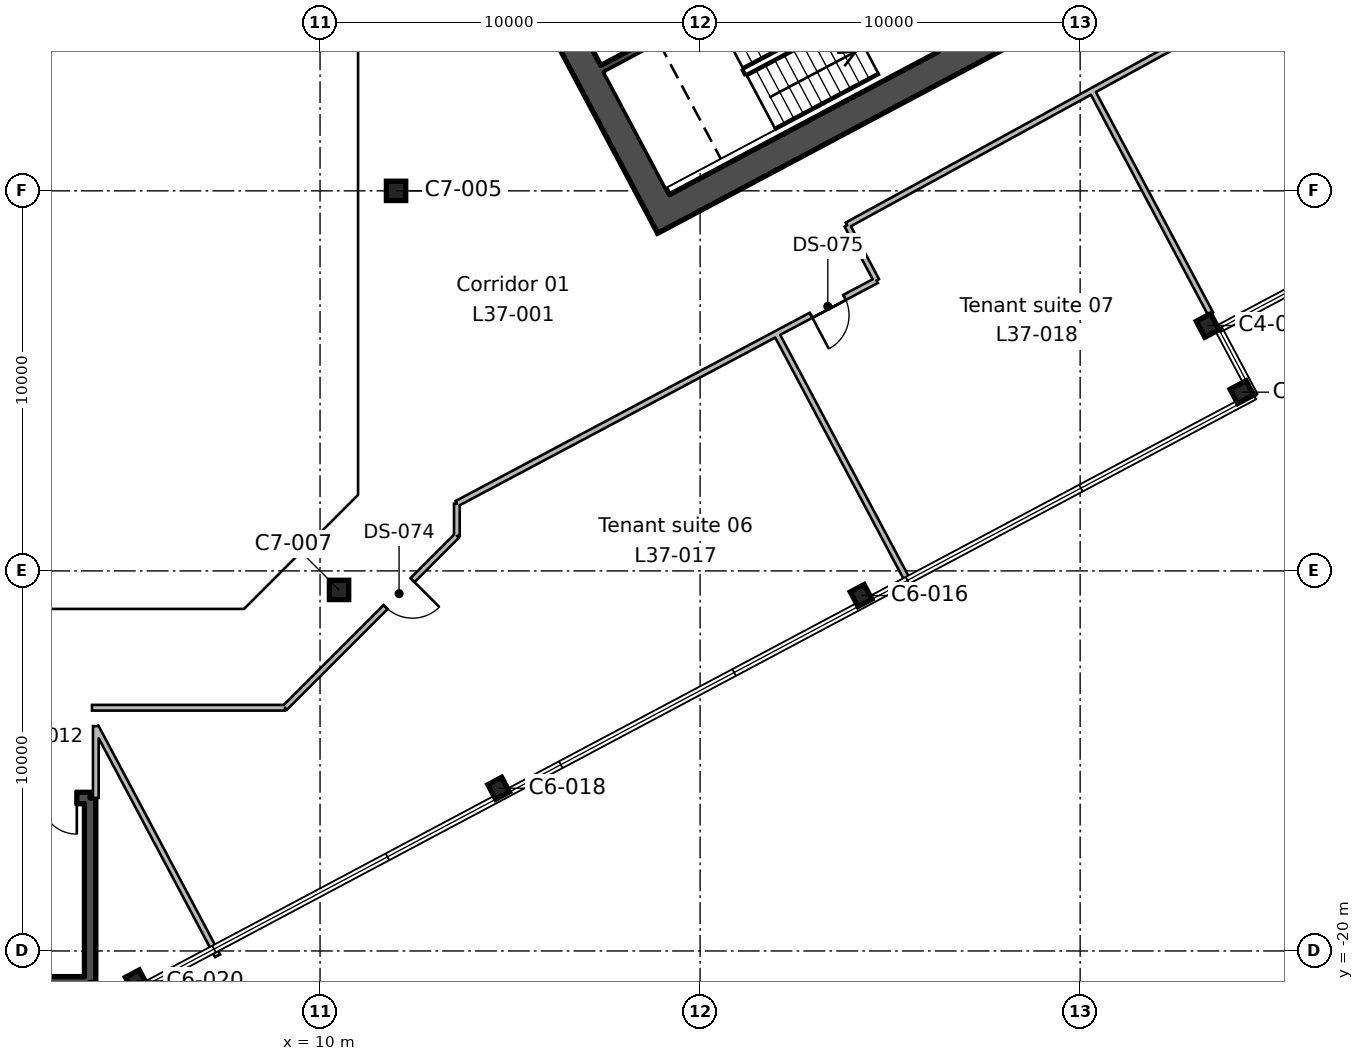
"""IFC4 building model, lengths in metres.
Left out: names, types, materials, properties, quantities, classifications, styles, units other than length and angle.
Written with IfcOpenShell. Run it as: python <this file> out.ifc"""

import sys

from ifc_helpers import new_model, si_unit, direction, frame, frame_2d, origin, origin_2d, place, context, subcontext, project, spatial, rectangle, hollow_rectangle, i_section, extrude, element, fill, save


model = new_model("IFC4")
c1 = context("Model", 3, precision=1e-05, world=origin(), true_north=direction((0.0, 1.0)))
c2 = subcontext(c1, "Body", "Model", "MODEL_VIEW")
j1 = project(units=[si_unit("LENGTHUNIT", "METRE"), si_unit("PLANEANGLEUNIT", "RADIAN")], contexts=[c1])
p1 = place(None, origin())
s1 = spatial("IfcSite", under=j1, at=p1, CompositionType="ELEMENT")
p2 = place(p1, origin())
s2 = spatial("IfcBuilding", under=s1, at=p2, CompositionType="ELEMENT")
p3 = place(p2, frame((0.0, 0.0, 174.2)))
s3 = spatial("IfcBuildingStorey", under=s2, at=p3, CompositionType="ELEMENT", Elevation=174.2)
for number, where, z_axis, x_axis in (
    (1, (5.164, -20.789, 0.0), (0.0, 0.0, 1.0), (0.883, 0.469, 0.0)),
    (2, (14.7, -15.719, 0.0), (0.0, 0.0, 1.0), (0.883, 0.469, 0.0)),
    (3, (24.236, -10.648, 0.0), (0.0, 0.0, 1.0), (0.883, 0.469, 0.0)),
):
    element("IfcColumn", number, at=place(p3, frame(where, z_axis=z_axis, x_axis=x_axis)), inside=s3, PredefinedType="COLUMN", context=c2, shape_type="SweptSolid", body=[
        extrude(i_section(OverallWidth=0.412, OverallDepth=0.434, WebThickness=0.036, FlangeThickness=0.057, FilletRadius=0.015, at=origin_2d()), origin(), (0.0, 0.0, 1.0), 4.0),
    ])
p4 = place(p3, frame((10.5, -10.5, 0.0), z_axis=(0.0, 0.0, 1.0), x_axis=(1.0, 0.0, 0.0)))
e4 = element("IfcColumn", 4, at=p4, inside=s3, PredefinedType="COLUMN", context=c2, shape_type="SweptSolid", body=[
    extrude(hollow_rectangle(XDim=0.508, YDim=0.508, WallThickness=0.012, InnerFilletRadius=0.006, OuterFilletRadius=0.018, at=origin_2d()), origin(), (0.0, 0.0, 1.0), 4.0),
])
for number, where, z_axis, x_axis in (
    (5, (34.256, -5.297, 0.0), (0.0, 0.0, 1.0), (-0.469, 0.883, 0.0)),
    (6, (33.356, -3.543, 0.0), (0.0, 0.0, 1.0), (0.883, 0.469, 0.0)),
):
    element("IfcColumn", number, at=place(p3, frame(where, z_axis=z_axis, x_axis=x_axis)), inside=s3, PredefinedType="COLUMN", context=c2, shape_type="SweptSolid", body=[
        extrude(i_section(OverallWidth=0.424, OverallDepth=0.475, WebThickness=0.048, FlangeThickness=0.077, FilletRadius=0.015, at=origin_2d()), origin(), (0.0, 0.0, 1.0), 4.0),
    ])
p5 = place(p3, frame((12.0, 0.0, 0.0), z_axis=(0.0, 0.0, 1.0), x_axis=(1.0, 0.0, 0.0)))
e7 = element("IfcColumn", 7, at=p5, inside=s3, PredefinedType="COLUMN", context=c2, shape_type="SweptSolid", body=[
    extrude(hollow_rectangle(XDim=0.508, YDim=0.508, WallThickness=0.012, InnerFilletRadius=0.006, OuterFilletRadius=0.018, at=origin_2d()), origin(), (0.0, 0.0, 1.0), 4.0),
])
p6 = place(p3, frame((19.215, -0.939, 0.0), z_axis=(0.0, 0.0, 1.0), x_axis=(-0.469479580143, 0.882943329908, 0.0)))
e8 = element("IfcWall", 8, at=p6, inside=s3, PredefinedType="SHEAR", context=c2, shape_type="SweptSolid", body=[
    extrude(rectangle(XDim=19.7, YDim=0.75, at=frame_2d((9.85, 0.0))), origin(), (0.0, 0.0, 1.0), 4.0),
])
p7 = place(p6, frame((6.85, 0.0, 0.0)))
e9 = element("IfcOpeningElement", 9, at=p7, cuts=e8, PredefinedType="OPENING", context=c2, shape_type="SweptSolid", body=[
    extrude(rectangle(XDim=2.4, YDim=2.4, at=frame_2d((1.2, 1.2))), frame((0.0, 0.385, 0.0), z_axis=(0.0, -1.0, 0.0), x_axis=(1.0, 0.0, 0.0)), (0.0, 0.0, 1.0), 0.77),
])
p8 = place(p3, frame((19.37, -0.432, 0.0), z_axis=(0.0, 0.0, 1.0), x_axis=(0.88294509198, 0.469476266226, 0.0)))
e10 = element("IfcWall", 10, at=p8, inside=s3, PredefinedType="SHEAR", context=c2, shape_type="SweptSolid", body=[
    extrude(rectangle(XDim=20.2, YDim=0.75, at=frame_2d((10.1, 0.0))), origin(), (0.0, 0.0, 1.0), 4.0),
])
p9 = place(p3, frame((17.434, 3.21, 0.0), z_axis=(0.0, 0.0, 1.0), x_axis=(0.882940221191, 0.469485426614, 0.0)))
e11 = element("IfcWall", 11, at=p9, inside=s3, PredefinedType="SHEAR", context=c2, shape_type="SweptSolid", body=[
    extrude(rectangle(XDim=8.0, YDim=0.2, at=frame_2d((4.0, 0.0))), origin(), (0.0, 0.0, 1.0), 4.0),
])
p10 = place(p3, frame((3.95, -15.975, 0.0), z_axis=(0.0, 0.0, 1.0), x_axis=(0.0, -1.0, 0.0)))
e12 = element("IfcWall", 12, at=p10, inside=s3, PredefinedType="SHEAR", context=c2, shape_type="SweptSolid", body=[
    extrude(rectangle(XDim=4.85, YDim=0.3, at=frame_2d((2.425, 0.0))), origin(), (0.0, 0.0, 1.0), 4.0),
])
p11 = place(p3, frame((3.95, -20.825, 0.0), z_axis=(0.0, 0.0, 1.0), x_axis=(-1.0, 0.0, 0.0)))
e13 = element("IfcWall", 13, at=p11, inside=s3, PredefinedType="SHEAR", context=c2, shape_type="SweptSolid", body=[
    extrude(rectangle(XDim=8.3, YDim=0.3, at=frame_2d((4.15, 0.0))), origin(), (0.0, 0.0, 1.0), 4.0),
])
p12 = place(p3, frame((-4.35, -15.975, 0.0), z_axis=(0.0, 0.0, 1.0), x_axis=(1.0, 0.0, 0.0)))
e14 = element("IfcWall", 14, at=p12, inside=s3, PredefinedType="SHEAR", context=c2, shape_type="SweptSolid", body=[
    extrude(rectangle(XDim=8.3, YDim=0.3, at=frame_2d((4.15, 0.0))), origin(), (0.0, 0.0, 1.0), 4.0),
])
p13 = place(p12, frame((6.05, 0.0, 0.0)))
e15 = element("IfcOpeningElement", 15, at=p13, cuts=e14, PredefinedType="OPENING", context=c2, shape_type="SweptSolid", body=[
    extrude(rectangle(XDim=1.9, YDim=2.1, at=frame_2d((0.95, 1.05))), frame((0.0, 0.16, 0.0), z_axis=(0.0, -1.0, 0.0), x_axis=(1.0, 0.0, 0.0)), (0.0, 0.0, 1.0), 0.32),
])
p14 = place(p3, frame((13.6, -8.233, 0.0), z_axis=(0.0, 0.0, 1.0), x_axis=(0.0, -1.0, 0.0)))
e16 = element("IfcWall", 16, at=p14, inside=s3, PredefinedType="PARTITIONING", context=c2, shape_type="SweptSolid", body=[
    extrude(rectangle(XDim=0.844, YDim=0.15, at=frame_2d((0.422, 0.0))), origin(), (0.0, 0.0, 1.0), 3.6),
])
p15 = place(p3, frame((13.6, -9.077, 0.0), z_axis=(0.0, 0.0, 1.0), x_axis=(-0.707106781187, -0.707106781187, 0.0)))
e17 = element("IfcWall", 17, at=p15, inside=s3, PredefinedType="PARTITIONING", context=c2, shape_type="SweptSolid", body=[
    extrude(rectangle(XDim=6.397, YDim=0.15, at=frame_2d((3.198, 0.0))), origin(), (0.0, 0.0, 1.0), 3.6),
])
p16 = place(p15, frame((1.65, 0.0, 0.0)))
e18 = element("IfcOpeningElement", 18, at=p16, cuts=e17, PredefinedType="OPENING", context=c2, shape_type="SweptSolid", body=[
    extrude(rectangle(XDim=1.0, YDim=2.1, at=frame_2d((0.5, 1.05))), frame((0.0, 0.085, 0.0), z_axis=(0.0, -1.0, 0.0), x_axis=(1.0, 0.0, 0.0)), (0.0, 0.0, 1.0), 0.17),
])
p17 = place(p3, frame((9.077, -13.6, 0.0), z_axis=(0.0, 0.0, 1.0), x_axis=(-1.0, 0.0, 0.0)))
e19 = element("IfcWall", 19, at=p17, inside=s3, PredefinedType="PARTITIONING", context=c2, shape_type="SweptSolid", body=[
    extrude(rectangle(XDim=5.078, YDim=0.15, at=frame_2d((2.539, 0.0))), origin(), (0.0, 0.0, 1.0), 3.6),
])
p18 = place(p3, frame((4.1, -14.084, 0.0), z_axis=(0.0, 0.0, 1.0), x_axis=(0.0, -1.0, 0.0)))
e20 = element("IfcWall", 20, at=p18, inside=s3, PredefinedType="PARTITIONING", context=c2, shape_type="SweptSolid", body=[
    extrude(rectangle(XDim=1.891, YDim=0.15, at=frame_2d((0.946, 0.0))), origin(), (0.0, 0.0, 1.0), 3.6),
])
p19 = place(p3, frame((7.304, -20.127, 0.0), z_axis=(0.0, 0.0, 1.0), x_axis=(-0.469394067071, 0.882988793699, 0.0)))
e21 = element("IfcWall", 21, at=p19, inside=s3, PredefinedType="PARTITIONING", context=c2, shape_type="SweptSolid", body=[
    extrude(rectangle(XDim=6.825, YDim=0.15, at=frame_2d((3.413, 0.0))), origin(), (0.0, 0.0, 1.0), 3.6),
])
p20 = place(p3, frame((22.007, -3.758, 0.0), z_axis=(0.0, 0.0, 1.0), x_axis=(0.469527165858, -0.882918025935, 0.0)))
e22 = element("IfcWall", 22, at=p20, inside=s3, PredefinedType="PARTITIONING", context=c2, shape_type="SweptSolid", body=[
    extrude(rectangle(XDim=7.55, YDim=0.15, at=frame_2d((3.775, 0.0))), origin(), (0.0, 0.0, 1.0), 3.6),
])
p21 = place(p3, frame((22.033, -3.745, 0.0), z_axis=(0.0, 0.0, 1.0), x_axis=(-0.882987596652, -0.469396318859, 0.0)))
e23 = element("IfcWall", 23, at=p21, inside=s3, PredefinedType="PARTITIONING", context=c2, shape_type="SweptSolid", body=[
    extrude(rectangle(XDim=9.55, YDim=0.15, at=frame_2d((4.775, 0.0))), origin(), (0.0, 0.0, 1.0), 3.6),
])
p22 = place(p3, frame((23.868, -0.904, 0.0), z_axis=(0.0, 0.0, 1.0), x_axis=(0.469549041813, -0.882906392169, 0.0)))
e24 = element("IfcWall", 24, at=p22, inside=s3, PredefinedType="PARTITIONING", context=c2, shape_type="SweptSolid", body=[
    extrude(rectangle(XDim=1.647, YDim=0.15, at=frame_2d((0.823, 0.0))), origin(), (0.0, 0.0, 1.0), 3.6),
])
p23 = place(p3, frame((24.641, -2.358, 0.0), z_axis=(0.0, 0.0, 1.0), x_axis=(-0.882887698607, -0.46958419016, 0.0)))
e25 = element("IfcWall", 25, at=p23, inside=s3, PredefinedType="PARTITIONING", context=c2, shape_type="SweptSolid", body=[
    extrude(rectangle(XDim=2.954, YDim=0.15, at=frame_2d((1.477, 0.0))), origin(), (0.0, 0.0, 1.0), 3.6),
])
p24 = place(p23, frame((0.95, 0.0, 0.0)))
e26 = element("IfcOpeningElement", 26, at=p24, cuts=e25, PredefinedType="OPENING", context=c2, shape_type="SweptSolid", body=[
    extrude(rectangle(XDim=1.0, YDim=2.1, at=frame_2d((0.5, 1.05))), frame((0.0, 0.085, 0.0), z_axis=(0.0, -1.0, 0.0), x_axis=(1.0, 0.0, 0.0)), (0.0, 0.0, 1.0), 0.17),
])
p25 = place(p3, frame((30.313, 2.631, 0.0), z_axis=(0.0, 0.0, 1.0), x_axis=(0.469521541478, -0.882921016902, 0.0)))
e27 = element("IfcWall", 27, at=p25, inside=s3, PredefinedType="PARTITIONING", context=c2, shape_type="SweptSolid", body=[
    extrude(rectangle(XDim=6.643, YDim=0.15, at=frame_2d((3.321, 0.0))), origin(), (0.0, 0.0, 1.0), 3.6),
])
p26 = place(p3, frame((30.405, 2.681, 0.0), z_axis=(0.0, 0.0, 1.0), x_axis=(-0.877016761441, -0.480459779952, 0.0)))
e28 = element("IfcWall", 28, at=p26, inside=s3, PredefinedType="PARTITIONING", context=c2, shape_type="SweptSolid", body=[
    extrude(rectangle(XDim=7.455, YDim=0.15, at=frame_2d((3.728, 0.0))), origin(), (0.0, 0.0, 1.0), 3.6),
])
p27 = place(p3, frame((48.425, 12.553, 0.0), z_axis=(0.0, 0.0, 1.0), x_axis=(-0.877014972238, -0.480463045894, 0.0)))
e29 = element("IfcWall", 29, at=p27, inside=s3, PredefinedType="PARTITIONING", context=c2, shape_type="SweptSolid", body=[
    extrude(rectangle(XDim=20.547, YDim=0.15, at=frame_2d((10.273, 0.0))), origin(), (0.0, 0.0, 1.0), 3.6),
])
p28 = place(p13, frame((1.9, 0.0, 0.0), z_axis=(0.0, 0.0, 1.0), x_axis=(-1.0, 0.0, 0.0)))
e30 = element("IfcDoor", 30, at=p28, inside=s3, OperationType="DOUBLE_DOOR_SINGLE_SWING", PredefinedType="DOOR", context=c2, shape_type="SweptSolid", body=[
    extrude(rectangle(XDim=1.9, YDim=2.1, at=frame_2d((0.95, 1.05))), frame((0.0, 0.025, 0.0), z_axis=(0.0, -1.0, 0.0), x_axis=(1.0, 0.0, 0.0)), (0.0, 0.0, 1.0), 0.05),
])
fill(e15, e30)
p29 = place(p16, origin())
e31 = element("IfcDoor", 31, at=p29, inside=s3, OperationType="SINGLE_SWING_LEFT", PredefinedType="DOOR", context=c2, shape_type="SweptSolid", body=[
    extrude(rectangle(XDim=1.0, YDim=2.1, at=frame_2d((0.5, 1.05))), frame((0.0, 0.025, 0.0), z_axis=(0.0, -1.0, 0.0), x_axis=(1.0, 0.0, 0.0)), (0.0, 0.0, 1.0), 0.05),
])
fill(e18, e31)
p30 = place(p24, origin())
e32 = element("IfcDoor", 32, at=p30, inside=s3, OperationType="SINGLE_SWING_RIGHT", PredefinedType="DOOR", context=c2, shape_type="SweptSolid", body=[
    extrude(rectangle(XDim=1.0, YDim=2.1, at=frame_2d((0.5, 1.05))), frame((0.0, 0.025, 0.0), z_axis=(0.0, -1.0, 0.0), x_axis=(1.0, 0.0, 0.0)), (0.0, 0.0, 1.0), 0.05),
])
fill(e26, e32)
save(model, sys.argv[1])
